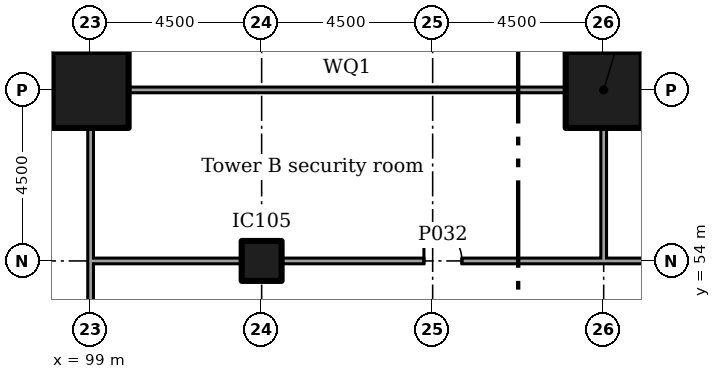
"""IFC4 building model, lengths in metres.
Left out: names, types, materials, properties, quantities, classifications, styles, units other than length and angle.
Written with IfcOpenShell. Run it as: python <this file> out.ifc"""

import sys

from ifc_helpers import new_model, si_unit, direction, frame, frame_2d, origin, origin_2d, place, context, subcontext, project, spatial, rectangle, extrude, element, fill, save


model = new_model("IFC4")
c1 = context("Model", 3, precision=1e-05, world=origin(), true_north=direction((0.0, 1.0)))
c2 = subcontext(c1, "Body", "Model", "MODEL_VIEW")
j1 = project(units=[si_unit("LENGTHUNIT", "METRE"), si_unit("PLANEANGLEUNIT", "RADIAN")], contexts=[c1])
p1 = place(None, origin())
s1 = spatial("IfcSite", under=j1, at=p1, CompositionType="ELEMENT")
p2 = place(p1, origin())
s2 = spatial("IfcBuilding", under=s1, at=p2, CompositionType="ELEMENT")
p3 = place(p2, origin())
s3 = spatial("IfcBuildingStorey", under=s2, at=p3, CompositionType="ELEMENT", Elevation=0.0)
for number, where in (
    (1, (99.0, 58.5, 0.0)),
    (2, (112.5, 58.5, 0.0)),
):
    element("IfcColumn", number, at=place(p3, frame(where)), inside=s3, PredefinedType="COLUMN", context=c2, shape_type="SweptSolid", body=[
        extrude(rectangle(XDim=2.0, YDim=2.0, at=origin_2d()), origin(), (0.0, 0.0, 1.0), 6.0),
    ])
p4 = place(p3, frame((103.5, 54.0, 0.0)))
e3 = element("IfcColumn", 3, at=p4, inside=s3, PredefinedType="COLUMN", context=c2, shape_type="SweptSolid", body=[
    extrude(rectangle(XDim=1.05, YDim=1.05, at=origin_2d()), origin(), (0.0, 0.0, 1.0), 6.0),
])
p5 = place(p3, frame((99.0, 36.52, 0.0), z_axis=(0.0, 0.0, 1.0), x_axis=(0.0, 1.0, 0.0)))
e4 = element("IfcWall", 4, at=p5, inside=s3, PredefinedType="PARTITIONING", context=c2, shape_type="SweptSolid", body=[
    extrude(rectangle(XDim=17.555, YDim=0.15, at=frame_2d((8.777, 0.0))), origin(), (0.0, 0.0, 1.0), 5.55),
])
p6 = place(p5, frame((7.85, 0.0, 0.0)))
e5 = element("IfcOpeningElement", 5, at=p6, cuts=e4, PredefinedType="OPENING", context=c2, shape_type="SweptSolid", body=[
    extrude(rectangle(XDim=1.8, YDim=2.1, at=frame_2d((0.9, 1.05))), frame((0.0, 0.085, 0.0), z_axis=(0.0, -1.0, 0.0), x_axis=(1.0, 0.0, 0.0)), (0.0, 0.0, 1.0), 0.17),
])
p7 = place(p3, frame((99.0, 54.0, 0.0), z_axis=(0.0, 0.0, 1.0), x_axis=(0.0, 1.0, 0.0)))
e6 = element("IfcWall", 6, at=p7, inside=s3, PredefinedType="PARTITIONING", context=c2, shape_type="SweptSolid", body=[
    extrude(rectangle(XDim=3.505, YDim=0.15, at=frame_2d((1.752, 0.0))), origin(), (0.0, 0.0, 1.0), 5.55),
])
p8 = place(p3, frame((94.575, 58.5, 0.0)))
e7 = element("IfcWall", 7, at=p8, inside=s3, PredefinedType="PARTITIONING", context=c2, shape_type="SweptSolid", body=[
    extrude(rectangle(XDim=3.43, YDim=0.15, at=frame_2d((1.715, 0.0))), origin(), (0.0, 0.0, 1.0), 5.55),
])
p9 = place(p3, frame((99.075, 54.0, 0.0)))
e8 = element("IfcWall", 8, at=p9, inside=s3, PredefinedType="PARTITIONING", context=c2, shape_type="SweptSolid", body=[
    extrude(rectangle(XDim=3.905, YDim=0.15, at=frame_2d((1.953, 0.0))), origin(), (0.0, 0.0, 1.0), 5.55),
])
p10 = place(p3, frame((104.02, 54.0, 0.0)))
e9 = element("IfcWall", 9, at=p10, inside=s3, PredefinedType="PARTITIONING", context=c2, shape_type="SweptSolid", body=[
    extrude(rectangle(XDim=8.555, YDim=0.15, at=frame_2d((4.277, 0.0))), origin(), (0.0, 0.0, 1.0), 5.55),
])
p11 = place(p10, frame((3.75, 0.0, 0.0)))
e10 = element("IfcOpeningElement", 10, at=p11, cuts=e9, PredefinedType="OPENING", context=c2, shape_type="SweptSolid", body=[
    extrude(rectangle(XDim=1.0, YDim=2.1, at=frame_2d((0.5, 1.05))), frame((0.0, 0.085, 0.0), z_axis=(0.0, -1.0, 0.0), x_axis=(1.0, 0.0, 0.0)), (0.0, 0.0, 1.0), 0.17),
])
p12 = place(p3, frame((112.5, 54.0, 0.0)))
e11 = element("IfcWall", 11, at=p12, inside=s3, PredefinedType="PARTITIONING", context=c2, shape_type="SweptSolid", body=[
    extrude(rectangle(XDim=9.075, YDim=0.15, at=frame_2d((4.538, 0.0))), origin(), (0.0, 0.0, 1.0), 5.55),
])
p13 = place(p12, frame((4.0, 0.0, 0.0)))
e12 = element("IfcOpeningElement", 12, at=p13, cuts=e11, PredefinedType="OPENING", context=c2, shape_type="SweptSolid", body=[
    extrude(rectangle(XDim=1.0, YDim=2.1, at=frame_2d((0.5, 1.05))), frame((0.0, 0.085, 0.0), z_axis=(0.0, -1.0, 0.0), x_axis=(1.0, 0.0, 0.0)), (0.0, 0.0, 1.0), 0.17),
])
p14 = place(p3, frame((112.5, 54.075, 0.0), z_axis=(0.0, 0.0, 1.0), x_axis=(0.0, 1.0, 0.0)))
e13 = element("IfcWall", 13, at=p14, inside=s3, PredefinedType="PARTITIONING", context=c2, shape_type="SweptSolid", body=[
    extrude(rectangle(XDim=3.43, YDim=0.15, at=frame_2d((1.715, 0.0))), origin(), (0.0, 0.0, 1.0), 5.55),
])
p15 = place(p3, frame((99.995, 58.5, 0.0)))
e14 = element("IfcWall", 14, at=p15, inside=s3, PredefinedType="PARTITIONING", context=c2, shape_type="SweptSolid", body=[
    extrude(rectangle(XDim=11.51, YDim=0.15, at=frame_2d((5.755, 0.0))), origin(), (0.0, 0.0, 1.0), 5.55),
])
p16 = place(p3, frame((113.495, 58.5, 0.0)))
e15 = element("IfcWall", 15, at=p16, inside=s3, PredefinedType="PARTITIONING", context=c2, shape_type="SweptSolid", body=[
    extrude(rectangle(XDim=7.01, YDim=0.15, at=frame_2d((3.505, 0.0))), origin(), (0.0, 0.0, 1.0), 5.55),
])
p17 = place(p3, frame((112.5, 59.495, 0.0), z_axis=(0.0, 0.0, 1.0), x_axis=(0.0, 1.0, 0.0)))
e16 = element("IfcWall", 16, at=p17, inside=s3, PredefinedType="PARTITIONING", context=c2, shape_type="SweptSolid", body=[
    extrude(rectangle(XDim=21.58, YDim=0.15, at=frame_2d((10.79, 0.0))), origin(), (0.0, 0.0, 1.0), 5.55),
])
p18 = place(p11, origin())
e17 = element("IfcDoor", 17, at=p18, inside=s3, OperationType="SINGLE_SWING_RIGHT", PredefinedType="DOOR", context=c2, shape_type="SweptSolid", body=[
    extrude(rectangle(XDim=1.0, YDim=2.1, at=frame_2d((0.5, 1.05))), frame((0.0, 0.025, 0.0), z_axis=(0.0, -1.0, 0.0), x_axis=(1.0, 0.0, 0.0)), (0.0, 0.0, 1.0), 0.05),
])
fill(e10, e17)
save(model, sys.argv[1])
